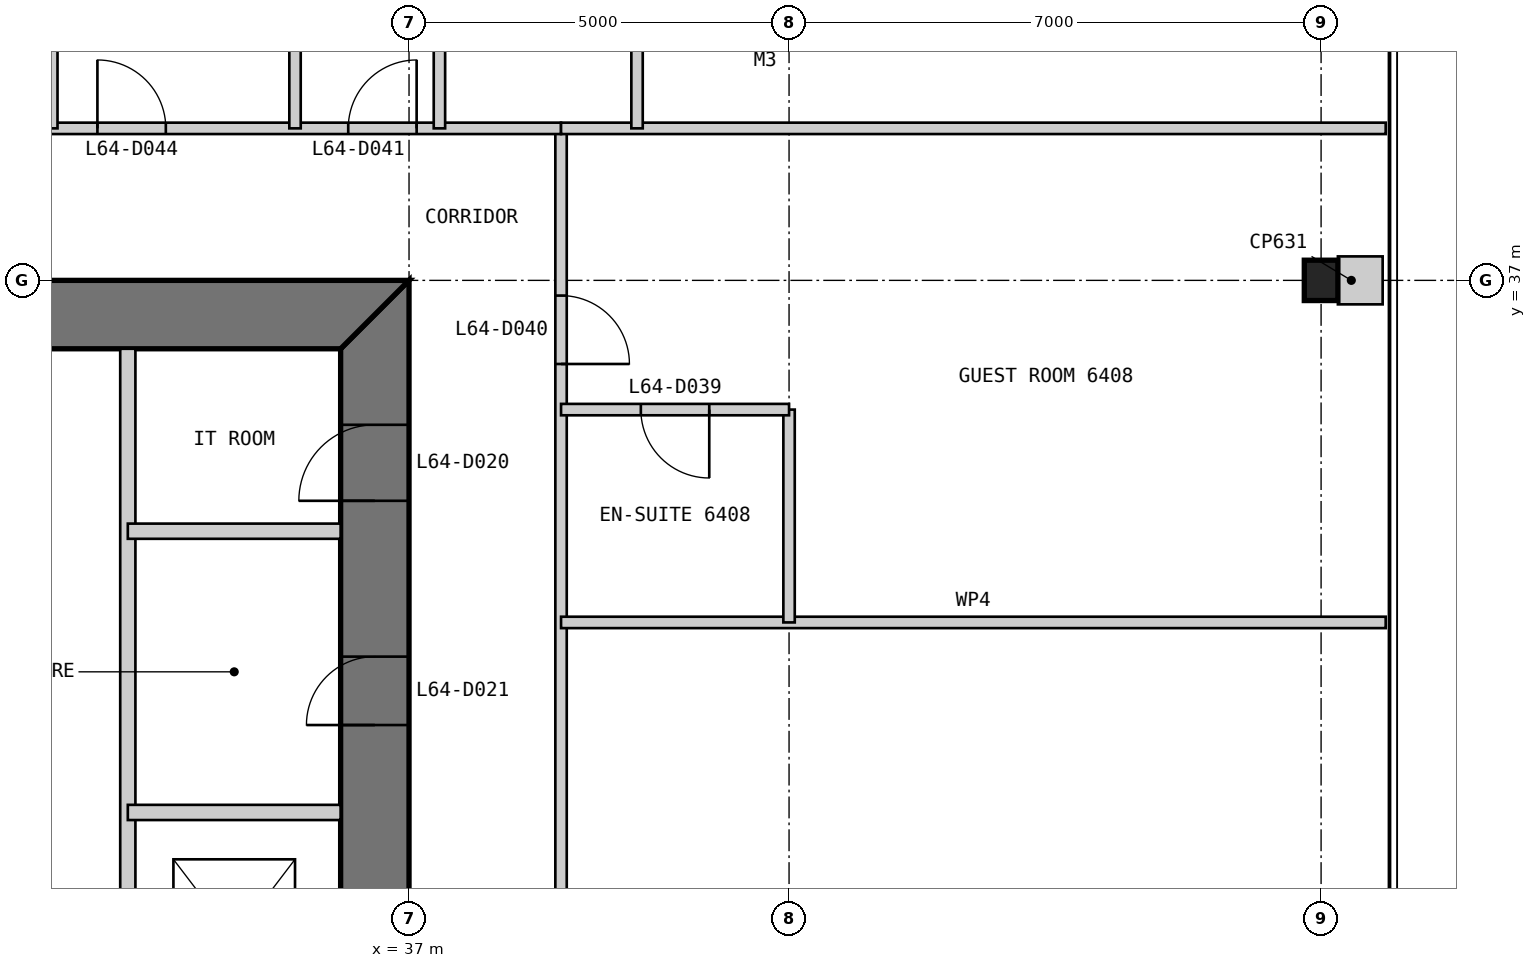
"""IFC4 building model, lengths in metres.
Left out: names, types, materials, properties, quantities, classifications, styles, units other than length and angle.
Written with IfcOpenShell. Run it as: python <this file> out.ifc"""

import sys

from ifc_helpers import new_model, si_unit, direction, frame, frame_2d, origin, origin_2d, place, context, subcontext, project, spatial, polyline, rectangle, i_section, outline, extrude, element, fill, save


model = new_model("IFC4")
c1 = context("Model", 3, precision=1e-05, world=origin(), true_north=direction((0.0, 1.0)))
c2 = subcontext(c1, "Body", "Model", "MODEL_VIEW")
j1 = project(units=[si_unit("LENGTHUNIT", "METRE"), si_unit("PLANEANGLEUNIT", "RADIAN")], contexts=[c1])
p1 = place(None, origin())
s1 = spatial("IfcSite", under=j1, at=p1, CompositionType="ELEMENT")
p2 = place(p1, origin())
s2 = spatial("IfcBuilding", under=s1, at=p2, CompositionType="ELEMENT")
p3 = place(p2, frame((0.0, 0.0, 269.6)))
s3 = spatial("IfcBuildingStorey", under=s2, at=p3, CompositionType="ELEMENT", Elevation=269.6)
p4 = place(p3, frame((49.0, 37.0, 0.0), z_axis=(0.0, 0.0, 1.0), x_axis=(1.0, 0.0, 0.0)))
e1 = element("IfcColumn", 1, at=p4, inside=s3, PredefinedType="COLUMN", context=c2, shape_type="SweptSolid", body=[
    extrude(i_section(OverallWidth=0.442, OverallDepth=0.531, WebThickness=0.066, FlangeThickness=0.106, at=origin_2d()), origin(), (0.0, 0.0, 1.0), 3.4),
])
p5 = place(p3, frame((36.55, 13.9, 0.0), z_axis=(0.0, 0.0, 1.0), x_axis=(0.0, 1.0, 0.0)))
e2 = element("IfcWall", 2, at=p5, inside=s3, PredefinedType="SHEAR", context=c2, shape_type="SweptSolid", body=[
    extrude(outline(polyline([(-0.9, -0.45), (23.1, -0.45), (22.2, 0.45), (0.0, 0.45), (-0.9, -0.45)])), origin(), (0.0, 0.0, 1.0), 3.4),
])
p6 = place(p5, frame((20.2, 0.0, 0.0)))
e3 = element("IfcOpeningElement", 3, at=p6, cuts=e2, PredefinedType="OPENING", context=c2, shape_type="SweptSolid", body=[
    extrude(rectangle(XDim=1.0, YDim=2.2, at=frame_2d((0.5, 1.1))), frame((0.0, 0.46, 0.0), z_axis=(0.0, -1.0, 0.0), x_axis=(1.0, 0.0, 0.0)), (0.0, 0.0, 1.0), 0.92),
])
p7 = place(p5, frame((17.25, 0.0, 0.0)))
e4 = element("IfcOpeningElement", 4, at=p7, cuts=e2, PredefinedType="OPENING", context=c2, shape_type="SweptSolid", body=[
    extrude(rectangle(XDim=0.9, YDim=2.2, at=frame_2d((0.45, 1.1))), frame((0.0, 0.46, 0.0), z_axis=(0.0, -1.0, 0.0), x_axis=(1.0, 0.0, 0.0)), (0.0, 0.0, 1.0), 0.92),
])
p8 = place(p3, frame((37.0, 36.55, 0.0), z_axis=(0.0, 0.0, 1.0), x_axis=(-1.0, 0.0, 0.0)))
e5 = element("IfcWall", 5, at=p8, inside=s3, PredefinedType="SHEAR", context=c2, shape_type="SweptSolid", body=[
    extrude(outline(polyline([(0.0, -0.45), (24.0, -0.45), (23.1, 0.45), (0.9, 0.45), (0.0, -0.45)])), origin(), (0.0, 0.0, 1.0), 3.4),
])
p9 = place(p8, frame((4.9, 0.0, 0.0)))
e6 = element("IfcOpeningElement", 6, at=p9, cuts=e5, PredefinedType="OPENING", context=c2, shape_type="SweptSolid", body=[
    extrude(rectangle(XDim=1.0, YDim=2.2, at=frame_2d((0.5, 1.1))), frame((0.0, 0.46, 0.0), z_axis=(0.0, -1.0, 0.0), x_axis=(1.0, 0.0, 0.0)), (0.0, 0.0, 1.0), 0.92),
])
p10 = place(p8, frame((8.9, 0.0, 0.0)))
e7 = element("IfcOpeningElement", 7, at=p10, cuts=e5, PredefinedType="OPENING", context=c2, shape_type="SweptSolid", body=[
    extrude(rectangle(XDim=1.1, YDim=2.2, at=frame_2d((0.55, 1.1))), frame((0.0, 0.46, 0.0), z_axis=(0.0, -1.0, 0.0), x_axis=(1.0, 0.0, 0.0)), (0.0, 0.0, 1.0), 0.92),
])
p11 = place(p8, frame((15.05, 0.0, 0.0)))
e8 = element("IfcOpeningElement", 8, at=p11, cuts=e5, PredefinedType="OPENING", context=c2, shape_type="SweptSolid", body=[
    extrude(rectangle(XDim=0.9, YDim=2.2, at=frame_2d((0.45, 1.1))), frame((0.0, 0.46, 0.0), z_axis=(0.0, -1.0, 0.0), x_axis=(1.0, 0.0, 0.0)), (0.0, 0.0, 1.0), 0.92),
])
p12 = place(p8, frame((17.9, 0.0, 0.0)))
e9 = element("IfcOpeningElement", 9, at=p12, cuts=e5, PredefinedType="OPENING", context=c2, shape_type="SweptSolid", body=[
    extrude(rectangle(XDim=1.0, YDim=2.2, at=frame_2d((0.5, 1.1))), frame((0.0, 0.46, 0.0), z_axis=(0.0, -1.0, 0.0), x_axis=(1.0, 0.0, 0.0)), (0.0, 0.0, 1.0), 0.92),
])
p13 = place(p8, frame((21.4, 0.0, 0.0)))
e10 = element("IfcOpeningElement", 10, at=p13, cuts=e5, PredefinedType="OPENING", context=c2, shape_type="SweptSolid", body=[
    extrude(rectangle(XDim=1.0, YDim=2.2, at=frame_2d((0.5, 1.1))), frame((0.0, 0.46, 0.0), z_axis=(0.0, -1.0, 0.0), x_axis=(1.0, 0.0, 0.0)), (0.0, 0.0, 1.0), 0.92),
])
p14 = place(p3, frame((33.3, 36.1, 0.0), z_axis=(0.0, 0.0, 1.0), x_axis=(0.0, -1.0, 0.0)))
e11 = element("IfcWall", 11, at=p14, inside=s3, PredefinedType="PARTITIONING", context=c2, shape_type="SweptSolid", body=[
    extrude(rectangle(XDim=16.1, YDim=0.2, at=frame_2d((8.05, 0.0))), origin(), (0.0, 0.0, 1.0), 3.2),
])
p15 = place(p14, frame((7.217, 0.0, 0.0)))
e12 = element("IfcOpeningElement", 12, at=p15, cuts=e11, PredefinedType="OPENING", context=c2, shape_type="SweptSolid", body=[
    extrude(rectangle(XDim=1.1, YDim=2.2, at=frame_2d((0.55, 1.1))), frame((0.0, 0.11, 0.0), z_axis=(0.0, -1.0, 0.0), x_axis=(1.0, 0.0, 0.0)), (0.0, 0.0, 1.0), 0.22),
])
p16 = place(p14, frame((10.55, 0.0, 0.0)))
e13 = element("IfcOpeningElement", 13, at=p16, cuts=e11, PredefinedType="OPENING", context=c2, shape_type="SweptSolid", body=[
    extrude(rectangle(XDim=1.1, YDim=2.2, at=frame_2d((0.55, 1.1))), frame((0.0, 0.11, 0.0), z_axis=(0.0, -1.0, 0.0), x_axis=(1.0, 0.0, 0.0)), (0.0, 0.0, 1.0), 0.22),
])
p17 = place(p14, frame((13.883, 0.0, 0.0)))
e14 = element("IfcOpeningElement", 14, at=p17, cuts=e11, PredefinedType="OPENING", context=c2, shape_type="SweptSolid", body=[
    extrude(rectangle(XDim=1.1, YDim=2.2, at=frame_2d((0.55, 1.1))), frame((0.0, 0.11, 0.0), z_axis=(0.0, -1.0, 0.0), x_axis=(1.0, 0.0, 0.0)), (0.0, 0.0, 1.0), 0.22),
])
for number, where, z_axis, x_axis in (
    (15, (36.1, 30.0, 0.0), (0.0, 0.0, 1.0), (-1.0, 0.0, 0.0)),
    (16, (36.1, 33.7, 0.0), (0.0, 0.0, 1.0), (-1.0, 0.0, 0.0)),
):
    element("IfcWall", number, at=place(p3, frame(where, z_axis=z_axis, x_axis=x_axis)), inside=s3, PredefinedType="PARTITIONING", context=c2, shape_type="SweptSolid", body=[
        extrude(rectangle(XDim=2.8, YDim=0.2, at=frame_2d((1.4, 0.0))), origin(), (0.0, 0.0, 1.0), 3.2),
    ])
p18 = place(p3, frame((39.0, 11.0, 0.0), z_axis=(0.0, 0.0, 1.0), x_axis=(0.0, 1.0, 0.0)))
e17 = element("IfcWall", 17, at=p18, inside=s3, PredefinedType="PARTITIONING", context=c2, shape_type="SweptSolid", body=[
    extrude(rectangle(XDim=28.0, YDim=0.15, at=frame_2d((14.0, 0.0))), origin(), (0.0, 0.0, 1.0), 2.844),
])
p19 = place(p18, frame((2.075, 0.0, 0.0)))
e18 = element("IfcOpeningElement", 18, at=p19, cuts=e17, PredefinedType="OPENING", context=c2, shape_type="SweptSolid", body=[
    extrude(rectangle(XDim=0.9, YDim=2.1, at=frame_2d((0.45, 1.05))), frame((0.0, 0.085, 0.0), z_axis=(0.0, -1.0, 0.0), x_axis=(1.0, 0.0, 0.0)), (0.0, 0.0, 1.0), 0.17),
])
p20 = place(p18, frame((5.2, 0.0, 0.0)))
e19 = element("IfcOpeningElement", 19, at=p20, cuts=e17, PredefinedType="OPENING", context=c2, shape_type="SweptSolid", body=[
    extrude(rectangle(XDim=0.9, YDim=2.1, at=frame_2d((0.45, 1.05))), frame((0.0, 0.085, 0.0), z_axis=(0.0, -1.0, 0.0), x_axis=(1.0, 0.0, 0.0)), (0.0, 0.0, 1.0), 0.17),
])
p21 = place(p18, frame((13.3, 0.0, 0.0)))
e20 = element("IfcOpeningElement", 20, at=p21, cuts=e17, PredefinedType="OPENING", context=c2, shape_type="SweptSolid", body=[
    extrude(rectangle(XDim=0.9, YDim=2.1, at=frame_2d((0.45, 1.05))), frame((0.0, 0.085, 0.0), z_axis=(0.0, -1.0, 0.0), x_axis=(1.0, 0.0, 0.0)), (0.0, 0.0, 1.0), 0.17),
])
p22 = place(p18, frame((24.9, 0.0, 0.0)))
e21 = element("IfcOpeningElement", 21, at=p22, cuts=e17, PredefinedType="OPENING", context=c2, shape_type="SweptSolid", body=[
    extrude(rectangle(XDim=0.9, YDim=2.1, at=frame_2d((0.45, 1.05))), frame((0.0, 0.085, 0.0), z_axis=(0.0, -1.0, 0.0), x_axis=(1.0, 0.0, 0.0)), (0.0, 0.0, 1.0), 0.17),
])
p23 = place(p3, frame((49.85, 32.5, 0.0), z_axis=(0.0, 0.0, 1.0), x_axis=(-1.0, 0.0, 0.0)))
e22 = element("IfcWall", 22, at=p23, inside=s3, PredefinedType="PARTITIONING", context=c2, shape_type="SweptSolid", body=[
    extrude(rectangle(XDim=10.85, YDim=0.15, at=frame_2d((5.425, 0.0))), origin(), (0.0, 0.0, 1.0), 3.25),
])
p24 = place(p3, frame((42.0, 32.5, 0.0), z_axis=(0.0, 0.0, 1.0), x_axis=(0.0, 1.0, 0.0)))
e23 = element("IfcWall", 23, at=p24, inside=s3, PredefinedType="PARTITIONING", context=c2, shape_type="SweptSolid", body=[
    extrude(rectangle(XDim=2.8, YDim=0.15, at=frame_2d((1.4, 0.0))), origin(), (0.0, 0.0, 1.0), 3.25),
])
p25 = place(p3, frame((42.0, 35.3, 0.0), z_axis=(0.0, 0.0, 1.0), x_axis=(-1.0, 0.0, 0.0)))
e24 = element("IfcWall", 24, at=p25, inside=s3, PredefinedType="PARTITIONING", context=c2, shape_type="SweptSolid", body=[
    extrude(rectangle(XDim=3.0, YDim=0.15, at=frame_2d((1.5, 0.0))), origin(), (0.0, 0.0, 1.0), 3.25),
])
p26 = place(p25, frame((1.05, 0.0, 0.0)))
e25 = element("IfcOpeningElement", 25, at=p26, cuts=e24, PredefinedType="OPENING", context=c2, shape_type="SweptSolid", body=[
    extrude(rectangle(XDim=0.9, YDim=2.1, at=frame_2d((0.45, 1.05))), frame((0.0, 0.085, 0.0), z_axis=(0.0, -1.0, 0.0), x_axis=(1.0, 0.0, 0.0)), (0.0, 0.0, 1.0), 0.17),
])
p27 = place(p3, frame((39.0, 39.0, 0.0), z_axis=(0.0, 0.0, 1.0), x_axis=(-1.0, 0.0, 0.0)))
e26 = element("IfcWall", 26, at=p27, inside=s3, PredefinedType="PARTITIONING", context=c2, shape_type="SweptSolid", body=[
    extrude(rectangle(XDim=28.0, YDim=0.15, at=frame_2d((14.0, 0.0))), origin(), (0.0, 0.0, 1.0), 2.844),
])
p28 = place(p27, frame((1.9, 0.0, 0.0)))
e27 = element("IfcOpeningElement", 27, at=p28, cuts=e26, PredefinedType="OPENING", context=c2, shape_type="SweptSolid", body=[
    extrude(rectangle(XDim=0.9, YDim=2.1, at=frame_2d((0.45, 1.05))), frame((0.0, 0.085, 0.0), z_axis=(0.0, -1.0, 0.0), x_axis=(1.0, 0.0, 0.0)), (0.0, 0.0, 1.0), 0.17),
])
p29 = place(p27, frame((5.2, 0.0, 0.0)))
e28 = element("IfcOpeningElement", 28, at=p29, cuts=e26, PredefinedType="OPENING", context=c2, shape_type="SweptSolid", body=[
    extrude(rectangle(XDim=0.9, YDim=2.1, at=frame_2d((0.45, 1.05))), frame((0.0, 0.085, 0.0), z_axis=(0.0, -1.0, 0.0), x_axis=(1.0, 0.0, 0.0)), (0.0, 0.0, 1.0), 0.17),
])
p30 = place(p27, frame((13.3, 0.0, 0.0)))
e29 = element("IfcOpeningElement", 29, at=p30, cuts=e26, PredefinedType="OPENING", context=c2, shape_type="SweptSolid", body=[
    extrude(rectangle(XDim=0.9, YDim=2.1, at=frame_2d((0.45, 1.05))), frame((0.0, 0.085, 0.0), z_axis=(0.0, -1.0, 0.0), x_axis=(1.0, 0.0, 0.0)), (0.0, 0.0, 1.0), 0.17),
])
p31 = place(p27, frame((24.9, 0.0, 0.0)))
e30 = element("IfcOpeningElement", 30, at=p31, cuts=e26, PredefinedType="OPENING", context=c2, shape_type="SweptSolid", body=[
    extrude(rectangle(XDim=0.9, YDim=2.1, at=frame_2d((0.45, 1.05))), frame((0.0, 0.085, 0.0), z_axis=(0.0, -1.0, 0.0), x_axis=(1.0, 0.0, 0.0)), (0.0, 0.0, 1.0), 0.17),
])
p32 = place(p3, frame((49.85, 39.0, 0.0), z_axis=(0.0, 0.0, 1.0), x_axis=(-1.0, 0.0, 0.0)))
e31 = element("IfcWall", 31, at=p32, inside=s3, PredefinedType="PARTITIONING", context=c2, shape_type="SweptSolid", body=[
    extrude(rectangle(XDim=10.85, YDim=0.15, at=frame_2d((5.425, 0.0))), origin(), (0.0, 0.0, 1.0), 2.844),
])
for number, where, z_axis, x_axis in (
    (32, (40.0, 41.6, 0.0), (0.0, 0.0, 1.0), (0.0, -1.0, 0.0)),
    (33, (37.4, 41.6, 0.0), (0.0, 0.0, 1.0), (0.0, -1.0, 0.0)),
):
    element("IfcWall", number, at=place(p3, frame(where, z_axis=z_axis, x_axis=x_axis)), inside=s3, PredefinedType="PARTITIONING", context=c2, shape_type="SweptSolid", body=[
        extrude(rectangle(XDim=2.6, YDim=0.15, at=frame_2d((1.3, 0.0))), origin(), (0.0, 0.0, 1.0), 3.25),
    ])
p33 = place(p3, frame((35.5, 49.85, 0.0), z_axis=(0.0, 0.0, 1.0), x_axis=(0.0, -1.0, 0.0)))
e34 = element("IfcWall", 34, at=p33, inside=s3, PredefinedType="PARTITIONING", context=c2, shape_type="SweptSolid", body=[
    extrude(rectangle(XDim=10.85, YDim=0.15, at=frame_2d((5.425, 0.0))), origin(), (0.0, 0.0, 1.0), 3.25),
])
p34 = place(p3, frame((32.3, 42.0, 0.0), z_axis=(0.0, 0.0, 1.0), x_axis=(0.0, -1.0, 0.0)))
e35 = element("IfcWall", 35, at=p34, inside=s3, PredefinedType="PARTITIONING", context=c2, shape_type="SweptSolid", body=[
    extrude(rectangle(XDim=3.0, YDim=0.15, at=frame_2d((1.5, 0.0))), origin(), (0.0, 0.0, 1.0), 3.25),
])
p35 = place(p34, frame((1.05, 0.0, 0.0)))
e36 = element("IfcOpeningElement", 36, at=p35, cuts=e35, PredefinedType="OPENING", context=c2, shape_type="SweptSolid", body=[
    extrude(rectangle(XDim=0.9, YDim=2.1, at=frame_2d((0.45, 1.05))), frame((0.0, 0.085, 0.0), z_axis=(0.0, -1.0, 0.0), x_axis=(1.0, 0.0, 0.0)), (0.0, 0.0, 1.0), 0.17),
])
p36 = place(p3, frame((49.81, 37.0, 0.0), z_axis=(0.0, 0.0, 1.0), x_axis=(-1.0, 0.0, 0.0)))
e37 = element("IfcWall", 37, at=p36, inside=s3, PredefinedType="PARTITIONING", context=c2, shape_type="SweptSolid", body=[
    extrude(rectangle(XDim=0.589, YDim=0.631, at=frame_2d((0.294, 0.0))), origin(), (0.0, 0.0, 1.0), 3.25),
])
p37 = place(p6, origin())
e38 = element("IfcDoor", 38, at=p37, inside=s3, OperationType="SINGLE_SWING_LEFT", PredefinedType="DOOR", context=c2, shape_type="SweptSolid", body=[
    extrude(rectangle(XDim=1.0, YDim=2.2, at=frame_2d((0.5, 1.1))), frame((0.0, 0.025, 0.0), z_axis=(0.0, -1.0, 0.0), x_axis=(1.0, 0.0, 0.0)), (0.0, 0.0, 1.0), 0.05),
    extrude(outline(polyline([(0.0, 0.0), (0.04, 0.0), (0.04, 2.16), (0.96, 2.16), (0.96, 0.0), (1.0, 0.0), (1.0, 2.2), (0.0, 2.2), (0.0, 0.0)])), frame((0.0, 0.3, 0.0), z_axis=(0.0, -1.0, 0.0), x_axis=(1.0, 0.0, 0.0)), (0.0, 0.0, 1.0), 0.6),
])
fill(e3, e38)
p38 = place(p7, origin())
e39 = element("IfcDoor", 39, at=p38, inside=s3, OperationType="SINGLE_SWING_LEFT", PredefinedType="DOOR", context=c2, shape_type="SweptSolid", body=[
    extrude(rectangle(XDim=0.9, YDim=2.2, at=frame_2d((0.45, 1.1))), frame((0.0, 0.025, 0.0), z_axis=(0.0, -1.0, 0.0), x_axis=(1.0, 0.0, 0.0)), (0.0, 0.0, 1.0), 0.05),
    extrude(outline(polyline([(0.0, 0.0), (0.04, 0.0), (0.04, 2.16), (0.86, 2.16), (0.86, 0.0), (0.9, 0.0), (0.9, 2.2), (0.0, 2.2), (0.0, 0.0)])), frame((0.0, 0.3, 0.0), z_axis=(0.0, -1.0, 0.0), x_axis=(1.0, 0.0, 0.0)), (0.0, 0.0, 1.0), 0.6),
])
fill(e4, e39)
p39 = place(p26, origin())
e40 = element("IfcDoor", 40, at=p39, inside=s3, OperationType="SINGLE_SWING_LEFT", PredefinedType="DOOR", context=c2, shape_type="SweptSolid", body=[
    extrude(rectangle(XDim=0.9, YDim=2.1, at=frame_2d((0.45, 1.05))), frame((0.0, 0.025, 0.0), z_axis=(0.0, -1.0, 0.0), x_axis=(1.0, 0.0, 0.0)), (0.0, 0.0, 1.0), 0.05),
])
fill(e25, e40)
p40 = place(p22, frame((0.9, 0.0, 0.0), z_axis=(0.0, 0.0, 1.0), x_axis=(-1.0, 0.0, 0.0)))
e41 = element("IfcDoor", 41, at=p40, inside=s3, OperationType="SINGLE_SWING_RIGHT", PredefinedType="DOOR", context=c2, shape_type="SweptSolid", body=[
    extrude(rectangle(XDim=0.9, YDim=2.1, at=frame_2d((0.45, 1.05))), frame((0.0, 0.025, 0.0), z_axis=(0.0, -1.0, 0.0), x_axis=(1.0, 0.0, 0.0)), (0.0, 0.0, 1.0), 0.05),
])
fill(e21, e41)
p41 = place(p28, frame((0.9, 0.0, 0.0), z_axis=(0.0, 0.0, 1.0), x_axis=(-1.0, 0.0, 0.0)))
e42 = element("IfcDoor", 42, at=p41, inside=s3, OperationType="SINGLE_SWING_RIGHT", PredefinedType="DOOR", context=c2, shape_type="SweptSolid", body=[
    extrude(rectangle(XDim=0.9, YDim=2.1, at=frame_2d((0.45, 1.05))), frame((0.0, 0.025, 0.0), z_axis=(0.0, -1.0, 0.0), x_axis=(1.0, 0.0, 0.0)), (0.0, 0.0, 1.0), 0.05),
])
fill(e27, e42)
p42 = place(p29, frame((0.9, 0.0, 0.0), z_axis=(0.0, 0.0, 1.0), x_axis=(-1.0, 0.0, 0.0)))
e43 = element("IfcDoor", 43, at=p42, inside=s3, OperationType="SINGLE_SWING_LEFT", PredefinedType="DOOR", context=c2, shape_type="SweptSolid", body=[
    extrude(rectangle(XDim=0.9, YDim=2.1, at=frame_2d((0.45, 1.05))), frame((0.0, 0.025, 0.0), z_axis=(0.0, -1.0, 0.0), x_axis=(1.0, 0.0, 0.0)), (0.0, 0.0, 1.0), 0.05),
])
fill(e28, e43)
save(model, sys.argv[1])
